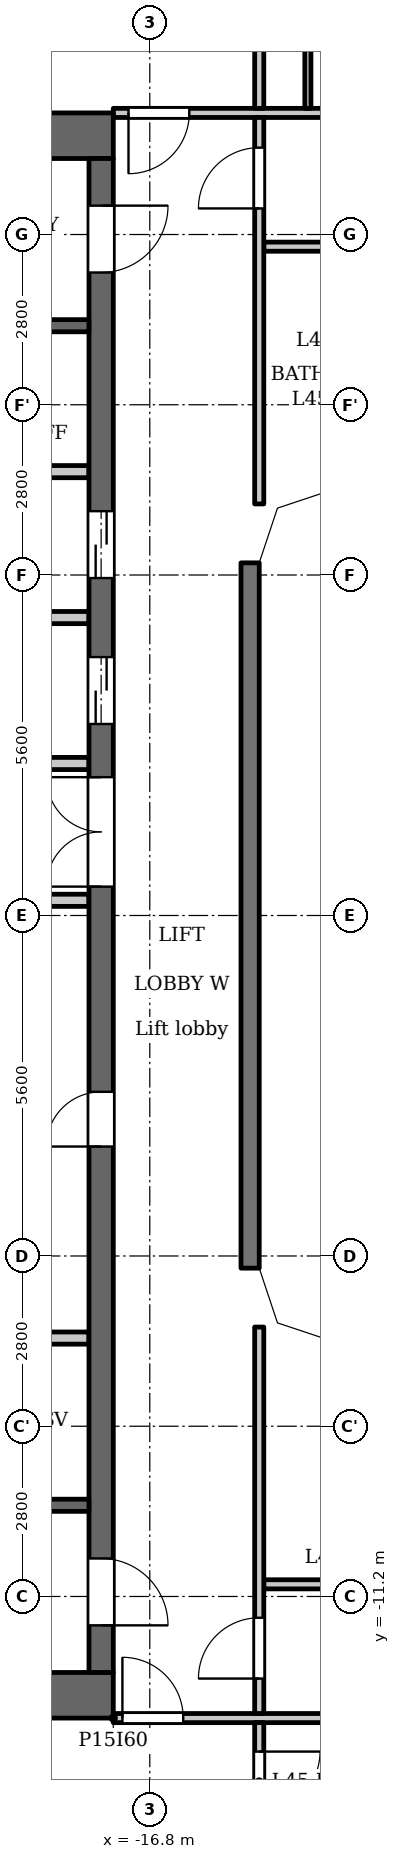
"""IFC4 building model, lengths in metres.
Left out: names, types, materials, properties, quantities, classifications, styles, units other than length and angle.
Written with IfcOpenShell. Run it as: python <this file> out.ifc"""

import sys

from ifc_helpers import new_model, si_unit, direction, frame, frame_2d, origin, place, context, subcontext, project, spatial, polyline, rectangle, outline, extrude, element, fill, save


model = new_model("IFC4")
c1 = context("Model", 3, precision=1e-05, world=origin(), true_north=direction((0.0, 1.0)))
c2 = subcontext(c1, "Body", "Model", "MODEL_VIEW")
j1 = project(units=[si_unit("LENGTHUNIT", "METRE"), si_unit("PLANEANGLEUNIT", "RADIAN")], contexts=[c1])
p1 = place(None, origin())
s1 = spatial("IfcSite", under=j1, at=p1, CompositionType="ELEMENT")
p2 = place(p1, origin())
s2 = spatial("IfcBuilding", under=s1, at=p2, CompositionType="ELEMENT")
p3 = place(p2, frame((0.0, 0.0, 174.6)))
s3 = spatial("IfcBuildingStorey", under=s2, at=p3, CompositionType="ELEMENT", Elevation=174.6)
p4 = place(p3, frame((-15.15, -5.8, 0.0), z_axis=(0.0, 0.0, 1.0), x_axis=(0.0, 1.0, 0.0)))
e1 = element("IfcWall", 1, at=p4, inside=s3, PredefinedType="SOLIDWALL", context=c2, shape_type="SweptSolid", body=[
    extrude(rectangle(XDim=11.6, YDim=0.3, at=frame_2d((5.8, 0.0))), origin(), (0.0, 0.0, 1.0), 3.15),
])
for number, where, z_axis, x_axis in (
    (2, (-17.4, 12.825, 0.0), (0.0, 0.0, 1.0), (-1.0, 0.0, 0.0)),
    (3, (-17.4, -12.825, 0.0), (0.0, 0.0, 1.0), (-1.0, 0.0, 0.0)),
):
    element("IfcWall", number, at=place(p3, frame(where, z_axis=z_axis, x_axis=x_axis)), inside=s3, PredefinedType="SHEAR", context=c2, shape_type="SweptSolid", body=[
        extrude(rectangle(XDim=10.4, YDim=0.75, at=frame_2d((5.2, 0.0))), origin(), (0.0, 0.0, 1.0), 3.15),
    ])
p5 = place(p3, frame((-17.6, -12.45, 0.0), z_axis=(0.0, 0.0, 1.0), x_axis=(0.0, 1.0, 0.0)))
e4 = element("IfcWall", 4, at=p5, inside=s3, PredefinedType="SHEAR", context=c2, shape_type="SweptSolid", body=[
    extrude(rectangle(XDim=24.9, YDim=0.4, at=frame_2d((12.45, 0.0))), origin(), (0.0, 0.0, 1.0), 3.15),
])
p6 = place(p5, frame((8.65, 0.0, 0.0)))
e5 = element("IfcOpeningElement", 5, at=p6, cuts=e4, PredefinedType="OPENING", context=c2, shape_type="SweptSolid", body=[
    extrude(rectangle(XDim=0.9, YDim=2.1, at=frame_2d((0.45, 1.05))), frame((0.0, 0.21, 0.0), z_axis=(0.0, -1.0, 0.0), x_axis=(1.0, 0.0, 0.0)), (0.0, 0.0, 1.0), 0.42),
])
p7 = place(p5, frame((15.6, 0.0, 0.0)))
e6 = element("IfcOpeningElement", 6, at=p7, cuts=e4, PredefinedType="OPENING", context=c2, shape_type="SweptSolid", body=[
    extrude(rectangle(XDim=1.1, YDim=2.1, at=frame_2d((0.55, 1.05))), frame((0.0, 0.21, 0.0), z_axis=(0.0, -1.0, 0.0), x_axis=(1.0, 0.0, 0.0)), (0.0, 0.0, 1.0), 0.42),
])
p8 = place(p5, frame((18.0, 0.0, 0.0)))
e7 = element("IfcOpeningElement", 7, at=p8, cuts=e4, PredefinedType="OPENING", context=c2, shape_type="SweptSolid", body=[
    extrude(rectangle(XDim=1.1, YDim=2.1, at=frame_2d((0.55, 1.05))), frame((0.0, 0.21, 0.0), z_axis=(0.0, -1.0, 0.0), x_axis=(1.0, 0.0, 0.0)), (0.0, 0.0, 1.0), 0.42),
])
p9 = place(p5, frame((23.025, 0.0, 0.0)))
e8 = element("IfcOpeningElement", 8, at=p9, cuts=e4, PredefinedType="OPENING", context=c2, shape_type="SweptSolid", body=[
    extrude(rectangle(XDim=1.1, YDim=2.1, at=frame_2d((0.55, 1.05))), frame((0.0, 0.21, 0.0), z_axis=(0.0, -1.0, 0.0), x_axis=(1.0, 0.0, 0.0)), (0.0, 0.0, 1.0), 0.42),
])
p10 = place(p5, frame((0.775, 0.0, 0.0)))
e9 = element("IfcOpeningElement", 9, at=p10, cuts=e4, PredefinedType="OPENING", context=c2, shape_type="SweptSolid", body=[
    extrude(rectangle(XDim=1.1, YDim=2.1, at=frame_2d((0.55, 1.05))), frame((0.0, 0.21, 0.0), z_axis=(0.0, -1.0, 0.0), x_axis=(1.0, 0.0, 0.0)), (0.0, 0.0, 1.0), 0.42),
])
p11 = place(p5, frame((12.925, 0.0, 0.0)))
e10 = element("IfcOpeningElement", 10, at=p11, cuts=e4, PredefinedType="OPENING", context=c2, shape_type="SweptSolid", body=[
    extrude(rectangle(XDim=1.8, YDim=2.1, at=frame_2d((0.9, 1.05))), frame((0.0, 0.21, 0.0), z_axis=(0.0, -1.0, 0.0), x_axis=(1.0, 0.0, 0.0)), (0.0, 0.0, 1.0), 0.42),
])
p12 = place(p3, frame((-17.8, -9.7, 0.0), z_axis=(0.0, 0.0, 1.0), x_axis=(-1.0, 0.0, 0.0)))
e11 = element("IfcWall", 11, at=p12, inside=s3, PredefinedType="SHEAR", context=c2, shape_type="SweptSolid", body=[
    extrude(rectangle(XDim=8.45, YDim=0.2, at=frame_2d((4.225, 0.0))), origin(), (0.0, 0.0, 1.0), 3.15),
])
p13 = place(p12, frame((0.85, 0.0, 0.0)))
e12 = element("IfcOpeningElement", 12, at=p13, cuts=e11, PredefinedType="OPENING", context=c2, shape_type="SweptSolid", body=[
    extrude(rectangle(XDim=1.1, YDim=2.1, at=frame_2d((0.55, 1.05))), frame((0.0, 0.11, 0.0), z_axis=(0.0, -1.0, 0.0), x_axis=(1.0, 0.0, 0.0)), (0.0, 0.0, 1.0), 0.22),
])
p14 = place(p12, frame((3.75, 0.0, 0.0)))
e13 = element("IfcOpeningElement", 13, at=p14, cuts=e11, PredefinedType="OPENING", context=c2, shape_type="SweptSolid", body=[
    extrude(rectangle(XDim=1.1, YDim=2.1, at=frame_2d((0.55, 1.05))), frame((0.0, 0.11, 0.0), z_axis=(0.0, -1.0, 0.0), x_axis=(1.0, 0.0, 0.0)), (0.0, 0.0, 1.0), 0.22),
])
p15 = place(p3, frame((-17.8, -6.95, 0.0), z_axis=(0.0, 0.0, 1.0), x_axis=(-1.0, 0.0, 0.0)))
e14 = element("IfcWall", 14, at=p15, inside=s3, PredefinedType="PARTITIONING", context=c2, shape_type="SweptSolid", body=[
    extrude(rectangle(XDim=2.8, YDim=0.2, at=frame_2d((1.4, 0.0))), origin(), (0.0, 0.0, 1.0), 3.15),
])
p16 = place(p3, frame((-17.8, 0.25, 0.0), z_axis=(0.0, 0.0, 1.0), x_axis=(-1.0, 0.0, 0.0)))
e15 = element("IfcWall", 15, at=p16, inside=s3, PredefinedType="PARTITIONING", context=c2, shape_type="SweptSolid", body=[
    extrude(rectangle(XDim=3.0, YDim=0.2, at=frame_2d((1.5, 0.0))), origin(), (0.0, 0.0, 1.0), 3.15),
])
p17 = place(p16, frame((1.98, 0.0, 0.0)))
e16 = element("IfcOpeningElement", 16, at=p17, cuts=e15, PredefinedType="OPENING", context=c2, shape_type="SweptSolid", body=[
    extrude(rectangle(XDim=0.9, YDim=2.1, at=frame_2d((0.45, 1.05))), frame((0.0, 0.11, 0.0), z_axis=(0.0, -1.0, 0.0), x_axis=(1.0, 0.0, 0.0)), (0.0, 0.0, 1.0), 0.22),
])
p18 = place(p3, frame((-17.8, 2.5, 0.0), z_axis=(0.0, 0.0, 1.0), x_axis=(-1.0, 0.0, 0.0)))
e17 = element("IfcWall", 17, at=p18, inside=s3, PredefinedType="PARTITIONING", context=c2, shape_type="SweptSolid", body=[
    extrude(rectangle(XDim=3.0, YDim=0.2, at=frame_2d((1.5, 0.0))), origin(), (0.0, 0.0, 1.0), 3.15),
])
for number, where, z_axis, x_axis in (
    (18, (-17.8, 4.9, 0.0), (0.0, 0.0, 1.0), (-1.0, 0.0, 0.0)),
    (19, (-17.8, 7.3, 0.0), (0.0, 0.0, 1.0), (-1.0, 0.0, 0.0)),
):
    element("IfcWall", number, at=place(p3, frame(where, z_axis=z_axis, x_axis=x_axis)), inside=s3, PredefinedType="PARTITIONING", context=c2, shape_type="SweptSolid", body=[
        extrude(rectangle(XDim=2.8, YDim=0.2, at=frame_2d((1.4, 0.0))), origin(), (0.0, 0.0, 1.0), 3.15),
    ])
p19 = place(p3, frame((-17.8, 9.7, 0.0), z_axis=(0.0, 0.0, 1.0), x_axis=(-1.0, 0.0, 0.0)))
e20 = element("IfcWall", 20, at=p19, inside=s3, PredefinedType="SHEAR", context=c2, shape_type="SweptSolid", body=[
    extrude(rectangle(XDim=8.45, YDim=0.2, at=frame_2d((4.225, 0.0))), origin(), (0.0, 0.0, 1.0), 3.15),
])
p20 = place(p19, frame((0.85, 0.0, 0.0)))
e21 = element("IfcOpeningElement", 21, at=p20, cuts=e20, PredefinedType="OPENING", context=c2, shape_type="SweptSolid", body=[
    extrude(rectangle(XDim=1.1, YDim=2.1, at=frame_2d((0.55, 1.05))), frame((0.0, 0.11, 0.0), z_axis=(0.0, -1.0, 0.0), x_axis=(1.0, 0.0, 0.0)), (0.0, 0.0, 1.0), 0.22),
])
p21 = place(p19, frame((3.75, 0.0, 0.0)))
e22 = element("IfcOpeningElement", 22, at=p21, cuts=e20, PredefinedType="OPENING", context=c2, shape_type="SweptSolid", body=[
    extrude(rectangle(XDim=1.1, YDim=2.1, at=frame_2d((0.55, 1.05))), frame((0.0, 0.11, 0.0), z_axis=(0.0, -1.0, 0.0), x_axis=(1.0, 0.0, 0.0)), (0.0, 0.0, 1.0), 0.22),
])
p22 = place(p3, frame((-17.4, -13.2, 0.0), z_axis=(0.0, 0.0, 1.0), x_axis=(1.0, 0.0, 0.0)))
e23 = element("IfcWall", 23, at=p22, inside=s3, PredefinedType="PARTITIONING", context=c2, shape_type="SweptSolid", body=[
    extrude(rectangle(XDim=34.8, YDim=0.15, at=frame_2d((17.4, 0.0))), origin(), (0.0, 0.0, 1.0), 3.15),
])
p23 = place(p22, frame((0.15, 0.0, 0.0)))
e24 = element("IfcOpeningElement", 24, at=p23, cuts=e23, PredefinedType="OPENING", context=c2, shape_type="SweptSolid", body=[
    extrude(rectangle(XDim=1.0, YDim=2.1, at=frame_2d((0.5, 1.05))), frame((0.0, 0.085, 0.0), z_axis=(0.0, -1.0, 0.0), x_axis=(1.0, 0.0, 0.0)), (0.0, 0.0, 1.0), 0.17),
])
p24 = place(p22, frame((33.55, 0.0, 0.0)))
e25 = element("IfcOpeningElement", 25, at=p24, cuts=e23, PredefinedType="OPENING", context=c2, shape_type="SweptSolid", body=[
    extrude(rectangle(XDim=1.0, YDim=2.1, at=frame_2d((0.5, 1.05))), frame((0.0, 0.085, 0.0), z_axis=(0.0, -1.0, 0.0), x_axis=(1.0, 0.0, 0.0)), (0.0, 0.0, 1.0), 0.17),
])
p25 = place(p22, frame((15.7, 0.0, 0.0)))
e26 = element("IfcOpeningElement", 26, at=p25, cuts=e23, PredefinedType="OPENING", context=c2, shape_type="SweptSolid", body=[
    extrude(rectangle(XDim=1.0, YDim=2.1, at=frame_2d((0.5, 1.05))), frame((0.0, 0.085, 0.0), z_axis=(0.0, -1.0, 0.0), x_axis=(1.0, 0.0, 0.0)), (0.0, 0.0, 1.0), 0.17),
])
p26 = place(p22, frame((26.9, 0.0, 0.0)))
e27 = element("IfcOpeningElement", 27, at=p26, cuts=e23, PredefinedType="OPENING", context=c2, shape_type="SweptSolid", body=[
    extrude(rectangle(XDim=1.0, YDim=2.1, at=frame_2d((0.5, 1.05))), frame((0.0, 0.085, 0.0), z_axis=(0.0, -1.0, 0.0), x_axis=(1.0, 0.0, 0.0)), (0.0, 0.0, 1.0), 0.17),
])
p27 = place(p3, frame((-14.925, -11.0, 0.0), z_axis=(0.0, 0.0, 1.0), x_axis=(1.0, 0.0, 0.0)))
e28 = element("IfcWall", 28, at=p27, inside=s3, PredefinedType="PARTITIONING", context=c2, shape_type="SweptSolid", body=[
    extrude(rectangle(XDim=29.85, YDim=0.15, at=frame_2d((14.925, 0.0))), origin(), (0.0, 0.0, 1.0), 3.15),
])
p28 = place(p27, frame((9.875, 0.0, 0.0)))
e29 = element("IfcOpeningElement", 29, at=p28, cuts=e28, PredefinedType="OPENING", context=c2, shape_type="SweptSolid", body=[
    extrude(rectangle(XDim=1.0, YDim=2.1, at=frame_2d((0.5, 1.05))), frame((0.0, 0.085, 0.0), z_axis=(0.0, -1.0, 0.0), x_axis=(1.0, 0.0, 0.0)), (0.0, 0.0, 1.0), 0.17),
])
p29 = place(p27, frame((17.875, 0.0, 0.0)))
e30 = element("IfcOpeningElement", 30, at=p29, cuts=e28, PredefinedType="OPENING", context=c2, shape_type="SweptSolid", body=[
    extrude(rectangle(XDim=1.0, YDim=2.1, at=frame_2d((0.5, 1.05))), frame((0.0, 0.085, 0.0), z_axis=(0.0, -1.0, 0.0), x_axis=(1.0, 0.0, 0.0)), (0.0, 0.0, 1.0), 0.17),
])
p30 = place(p3, frame((-14.925, 11.0, 0.0), z_axis=(0.0, 0.0, 1.0), x_axis=(1.0, 0.0, 0.0)))
e31 = element("IfcWall", 31, at=p30, inside=s3, PredefinedType="PARTITIONING", context=c2, shape_type="SweptSolid", body=[
    extrude(rectangle(XDim=29.85, YDim=0.15, at=frame_2d((14.925, 0.0))), origin(), (0.0, 0.0, 1.0), 3.15),
])
p31 = place(p30, frame((2.475, 0.0, 0.0)))
e32 = element("IfcOpeningElement", 32, at=p31, cuts=e31, PredefinedType="OPENING", context=c2, shape_type="SweptSolid", body=[
    extrude(rectangle(XDim=1.0, YDim=2.1, at=frame_2d((0.5, 1.05))), frame((0.0, 0.085, 0.0), z_axis=(0.0, -1.0, 0.0), x_axis=(1.0, 0.0, 0.0)), (0.0, 0.0, 1.0), 0.17),
])
p32 = place(p30, frame((26.275, 0.0, 0.0)))
e33 = element("IfcOpeningElement", 33, at=p32, cuts=e31, PredefinedType="OPENING", context=c2, shape_type="SweptSolid", body=[
    extrude(rectangle(XDim=1.0, YDim=2.1, at=frame_2d((0.5, 1.05))), frame((0.0, 0.085, 0.0), z_axis=(0.0, -1.0, 0.0), x_axis=(1.0, 0.0, 0.0)), (0.0, 0.0, 1.0), 0.17),
])
p33 = place(p3, frame((-17.4, 13.2, 0.0), z_axis=(0.0, 0.0, 1.0), x_axis=(1.0, 0.0, 0.0)))
e34 = element("IfcWall", 34, at=p33, inside=s3, PredefinedType="PARTITIONING", context=c2, shape_type="SweptSolid", body=[
    extrude(rectangle(XDim=34.8, YDim=0.15, at=frame_2d((17.4, 0.0))), origin(), (0.0, 0.0, 1.0), 3.15),
])
p34 = place(p33, frame((0.25, 0.0, 0.0)))
e35 = element("IfcOpeningElement", 35, at=p34, cuts=e34, PredefinedType="OPENING", context=c2, shape_type="SweptSolid", body=[
    extrude(rectangle(XDim=1.0, YDim=2.1, at=frame_2d((0.5, 1.05))), frame((0.0, 0.085, 0.0), z_axis=(0.0, -1.0, 0.0), x_axis=(1.0, 0.0, 0.0)), (0.0, 0.0, 1.0), 0.17),
])
p35 = place(p33, frame((33.65, 0.0, 0.0)))
e36 = element("IfcOpeningElement", 36, at=p35, cuts=e34, PredefinedType="OPENING", context=c2, shape_type="SweptSolid", body=[
    extrude(rectangle(XDim=1.0, YDim=2.1, at=frame_2d((0.5, 1.05))), frame((0.0, 0.085, 0.0), z_axis=(0.0, -1.0, 0.0), x_axis=(1.0, 0.0, 0.0)), (0.0, 0.0, 1.0), 0.17),
])
p36 = place(p33, frame((10.15, 0.0, 0.0)))
e37 = element("IfcOpeningElement", 37, at=p36, cuts=e34, PredefinedType="OPENING", context=c2, shape_type="SweptSolid", body=[
    extrude(rectangle(XDim=1.0, YDim=2.1, at=frame_2d((0.5, 1.05))), frame((0.0, 0.085, 0.0), z_axis=(0.0, -1.0, 0.0), x_axis=(1.0, 0.0, 0.0)), (0.0, 0.0, 1.0), 0.17),
])
p37 = place(p33, frame((15.75, 0.0, 0.0)))
e38 = element("IfcOpeningElement", 38, at=p37, cuts=e34, PredefinedType="OPENING", context=c2, shape_type="SweptSolid", body=[
    extrude(rectangle(XDim=1.0, YDim=2.1, at=frame_2d((0.5, 1.05))), frame((0.0, 0.085, 0.0), z_axis=(0.0, -1.0, 0.0), x_axis=(1.0, 0.0, 0.0)), (0.0, 0.0, 1.0), 0.17),
])
p38 = place(p33, frame((24.95, 0.0, 0.0)))
e39 = element("IfcOpeningElement", 39, at=p38, cuts=e34, PredefinedType="OPENING", context=c2, shape_type="SweptSolid", body=[
    extrude(rectangle(XDim=1.0, YDim=2.1, at=frame_2d((0.5, 1.05))), frame((0.0, 0.085, 0.0), z_axis=(0.0, -1.0, 0.0), x_axis=(1.0, 0.0, 0.0)), (0.0, 0.0, 1.0), 0.17),
])
p39 = place(p33, frame((29.95, 0.0, 0.0)))
e40 = element("IfcOpeningElement", 40, at=p39, cuts=e34, PredefinedType="OPENING", context=c2, shape_type="SweptSolid", body=[
    extrude(rectangle(XDim=1.0, YDim=2.1, at=frame_2d((0.5, 1.05))), frame((0.0, 0.085, 0.0), z_axis=(0.0, -1.0, 0.0), x_axis=(1.0, 0.0, 0.0)), (0.0, 0.0, 1.0), 0.17),
])
p40 = place(p3, frame((-15.0, -15.325, 0.0), z_axis=(0.0, 0.0, 1.0), x_axis=(0.0, 1.0, 0.0)))
e41 = element("IfcWall", 41, at=p40, inside=s3, PredefinedType="PARTITIONING", context=c2, shape_type="SweptSolid", body=[
    extrude(rectangle(XDim=2.05, YDim=0.15, at=frame_2d((1.025, 0.0))), origin(), (0.0, 0.0, 1.0), 3.15),
])
p41 = place(p40, frame((0.574, 0.0, 0.0)))
e42 = element("IfcOpeningElement", 42, at=p41, cuts=e41, PredefinedType="OPENING", context=c2, shape_type="SweptSolid", body=[
    extrude(rectangle(XDim=1.0, YDim=2.1, at=frame_2d((0.5, 1.05))), frame((0.0, 0.085, 0.0), z_axis=(0.0, -1.0, 0.0), x_axis=(1.0, 0.0, 0.0)), (0.0, 0.0, 1.0), 0.17),
])
p42 = place(p3, frame((-15.0, -13.125, 0.0), z_axis=(0.0, 0.0, 1.0), x_axis=(0.0, 1.0, 0.0)))
e43 = element("IfcWall", 43, at=p42, inside=s3, PredefinedType="PARTITIONING", context=c2, shape_type="SweptSolid", body=[
    extrude(rectangle(XDim=6.356, YDim=0.15, at=frame_2d((3.178, 0.0))), origin(), (0.0, 0.0, 1.0), 3.15),
])
p43 = place(p42, frame((0.575, 0.0, 0.0)))
e44 = element("IfcOpeningElement", 44, at=p43, cuts=e43, PredefinedType="OPENING", context=c2, shape_type="SweptSolid", body=[
    extrude(rectangle(XDim=1.0, YDim=2.1, at=frame_2d((0.5, 1.05))), frame((0.0, 0.085, 0.0), z_axis=(0.0, -1.0, 0.0), x_axis=(1.0, 0.0, 0.0)), (0.0, 0.0, 1.0), 0.17),
])
p44 = place(p3, frame((-15.0, 6.769, 0.0), z_axis=(0.0, 0.0, 1.0), x_axis=(0.0, 1.0, 0.0)))
e45 = element("IfcWall", 45, at=p44, inside=s3, PredefinedType="PARTITIONING", context=c2, shape_type="SweptSolid", body=[
    extrude(rectangle(XDim=6.356, YDim=0.15, at=frame_2d((3.178, 0.0))), origin(), (0.0, 0.0, 1.0), 3.15),
])
p45 = place(p44, frame((4.86, 0.0, 0.0)))
e46 = element("IfcOpeningElement", 46, at=p45, cuts=e45, PredefinedType="OPENING", context=c2, shape_type="SweptSolid", body=[
    extrude(rectangle(XDim=1.0, YDim=2.1, at=frame_2d((0.5, 1.05))), frame((0.0, 0.085, 0.0), z_axis=(0.0, -1.0, 0.0), x_axis=(1.0, 0.0, 0.0)), (0.0, 0.0, 1.0), 0.17),
])
p46 = place(p3, frame((-15.0, 13.275, 0.0), z_axis=(0.0, 0.0, 1.0), x_axis=(0.0, 1.0, 0.0)))
e47 = element("IfcWall", 47, at=p46, inside=s3, PredefinedType="PARTITIONING", context=c2, shape_type="SweptSolid", body=[
    extrude(rectangle(XDim=2.05, YDim=0.15, at=frame_2d((1.025, 0.0))), origin(), (0.0, 0.0, 1.0), 3.15),
])
p47 = place(p3, frame((-14.2, 13.275, 0.0), z_axis=(0.0, 0.0, 1.0), x_axis=(0.0, 1.0, 0.0)))
e48 = element("IfcWall", 48, at=p47, inside=s3, PredefinedType="PARTITIONING", context=c2, shape_type="SweptSolid", body=[
    extrude(rectangle(XDim=3.175, YDim=0.1, at=frame_2d((1.587, 0.0))), origin(), (0.0, 0.0, 1.0), 3.15),
])
p48 = place(p3, origin())
e49 = element("IfcWall", 49, at=p48, inside=s3, PredefinedType="SOLIDWALL", context=c2, shape_type="SweptSolid", body=[
    extrude(outline(polyline([(-13.849, 7.3), (-14.937, 6.937), (-15.3, 5.849), (-15.3, 5.8), (-15.0, 5.8), (-14.7, 6.7), (-13.8, 7.0), (-13.8, 7.3), (-13.849, 7.3)])), origin(), (0.0, 0.0, 1.0), 3.15),
])
e50 = element("IfcWall", 50, at=p48, inside=s3, PredefinedType="SOLIDWALL", context=c2, shape_type="SweptSolid", body=[
    extrude(outline(polyline([(-14.937, -6.937), (-13.849, -7.3), (-13.8, -7.3), (-13.8, -7.0), (-14.7, -6.7), (-15.0, -5.8), (-15.3, -5.8), (-15.3, -5.849), (-14.937, -6.937)])), origin(), (0.0, 0.0, 1.0), 3.15),
])
p49 = place(p6, origin())
e51 = element("IfcDoor", 51, at=p49, inside=s3, OperationType="SINGLE_SWING_RIGHT", PredefinedType="DOOR", context=c2, shape_type="SweptSolid", body=[
    extrude(rectangle(XDim=0.9, YDim=2.1, at=frame_2d((0.45, 1.05))), frame((0.0, 0.025, 0.0), z_axis=(0.0, -1.0, 0.0), x_axis=(1.0, 0.0, 0.0)), (0.0, 0.0, 1.0), 0.05),
])
fill(e5, e51)
p50 = place(p7, origin())
e52 = element("IfcDoor", 52, at=p50, inside=s3, OperationType="DOUBLE_DOOR_SLIDING", PredefinedType="DOOR", context=c2, shape_type="SweptSolid", body=[
    extrude(rectangle(XDim=1.1, YDim=2.1, at=frame_2d((0.55, 1.05))), frame((0.0, 0.025, 0.0), z_axis=(0.0, -1.0, 0.0), x_axis=(1.0, 0.0, 0.0)), (0.0, 0.0, 1.0), 0.05),
])
fill(e6, e52)
p51 = place(p8, origin())
e53 = element("IfcDoor", 53, at=p51, inside=s3, OperationType="DOUBLE_DOOR_SLIDING", PredefinedType="DOOR", context=c2, shape_type="SweptSolid", body=[
    extrude(rectangle(XDim=1.1, YDim=2.1, at=frame_2d((0.55, 1.05))), frame((0.0, 0.025, 0.0), z_axis=(0.0, -1.0, 0.0), x_axis=(1.0, 0.0, 0.0)), (0.0, 0.0, 1.0), 0.05),
])
fill(e7, e53)
p52 = place(p9, origin())
e54 = element("IfcDoor", 54, at=p52, inside=s3, OperationType="SINGLE_SWING_RIGHT", PredefinedType="DOOR", context=c2, shape_type="SweptSolid", body=[
    extrude(rectangle(XDim=1.1, YDim=2.1, at=frame_2d((0.55, 1.05))), frame((0.0, 0.025, 0.0), z_axis=(0.0, -1.0, 0.0), x_axis=(1.0, 0.0, 0.0)), (0.0, 0.0, 1.0), 0.05),
])
fill(e8, e54)
p53 = place(p10, origin())
e55 = element("IfcDoor", 55, at=p53, inside=s3, OperationType="SINGLE_SWING_LEFT", PredefinedType="DOOR", context=c2, shape_type="SweptSolid", body=[
    extrude(rectangle(XDim=1.1, YDim=2.1, at=frame_2d((0.55, 1.05))), frame((0.0, 0.025, 0.0), z_axis=(0.0, -1.0, 0.0), x_axis=(1.0, 0.0, 0.0)), (0.0, 0.0, 1.0), 0.05),
])
fill(e9, e55)
p54 = place(p11, origin())
e56 = element("IfcDoor", 56, at=p54, inside=s3, OperationType="DOUBLE_DOOR_SINGLE_SWING", PredefinedType="DOOR", context=c2, shape_type="SweptSolid", body=[
    extrude(rectangle(XDim=1.8, YDim=2.1, at=frame_2d((0.9, 1.05))), frame((0.0, 0.025, 0.0), z_axis=(0.0, -1.0, 0.0), x_axis=(1.0, 0.0, 0.0)), (0.0, 0.0, 1.0), 0.05),
])
fill(e10, e56)
p55 = place(p45, origin())
e57 = element("IfcDoor", 57, at=p55, inside=s3, OperationType="SINGLE_SWING_RIGHT", PredefinedType="DOOR", context=c2, shape_type="SweptSolid", body=[
    extrude(rectangle(XDim=1.0, YDim=2.1, at=frame_2d((0.5, 1.05))), frame((0.0, 0.025, 0.0), z_axis=(0.0, -1.0, 0.0), x_axis=(1.0, 0.0, 0.0)), (0.0, 0.0, 1.0), 0.05),
])
fill(e46, e57)
p56 = place(p34, origin())
e58 = element("IfcDoor", 58, at=p56, inside=s3, OperationType="SINGLE_SWING_LEFT", PredefinedType="DOOR", context=c2, shape_type="SweptSolid", body=[
    extrude(rectangle(XDim=1.0, YDim=2.1, at=frame_2d((0.5, 1.05))), frame((0.0, 0.025, 0.0), z_axis=(0.0, -1.0, 0.0), x_axis=(1.0, 0.0, 0.0)), (0.0, 0.0, 1.0), 0.05),
])
fill(e35, e58)
p57 = place(p43, origin())
e59 = element("IfcDoor", 59, at=p57, inside=s3, OperationType="SINGLE_SWING_RIGHT", PredefinedType="DOOR", context=c2, shape_type="SweptSolid", body=[
    extrude(rectangle(XDim=1.0, YDim=2.1, at=frame_2d((0.5, 1.05))), frame((0.0, 0.025, 0.0), z_axis=(0.0, -1.0, 0.0), x_axis=(1.0, 0.0, 0.0)), (0.0, 0.0, 1.0), 0.05),
])
fill(e44, e59)
p58 = place(p23, origin())
e60 = element("IfcDoor", 60, at=p58, inside=s3, OperationType="SINGLE_SWING_RIGHT", PredefinedType="DOOR", context=c2, shape_type="SweptSolid", body=[
    extrude(rectangle(XDim=1.0, YDim=2.1, at=frame_2d((0.5, 1.05))), frame((0.0, 0.025, 0.0), z_axis=(0.0, -1.0, 0.0), x_axis=(1.0, 0.0, 0.0)), (0.0, 0.0, 1.0), 0.05),
])
fill(e24, e60)
p59 = place(p41, origin())
e61 = element("IfcDoor", 61, at=p59, inside=s3, OperationType="SINGLE_SWING_RIGHT", PredefinedType="DOOR", context=c2, shape_type="SweptSolid", body=[
    extrude(rectangle(XDim=1.0, YDim=2.1, at=frame_2d((0.5, 1.05))), frame((0.0, 0.025, 0.0), z_axis=(0.0, -1.0, 0.0), x_axis=(1.0, 0.0, 0.0)), (0.0, 0.0, 1.0), 0.05),
])
fill(e42, e61)
save(model, sys.argv[1])
